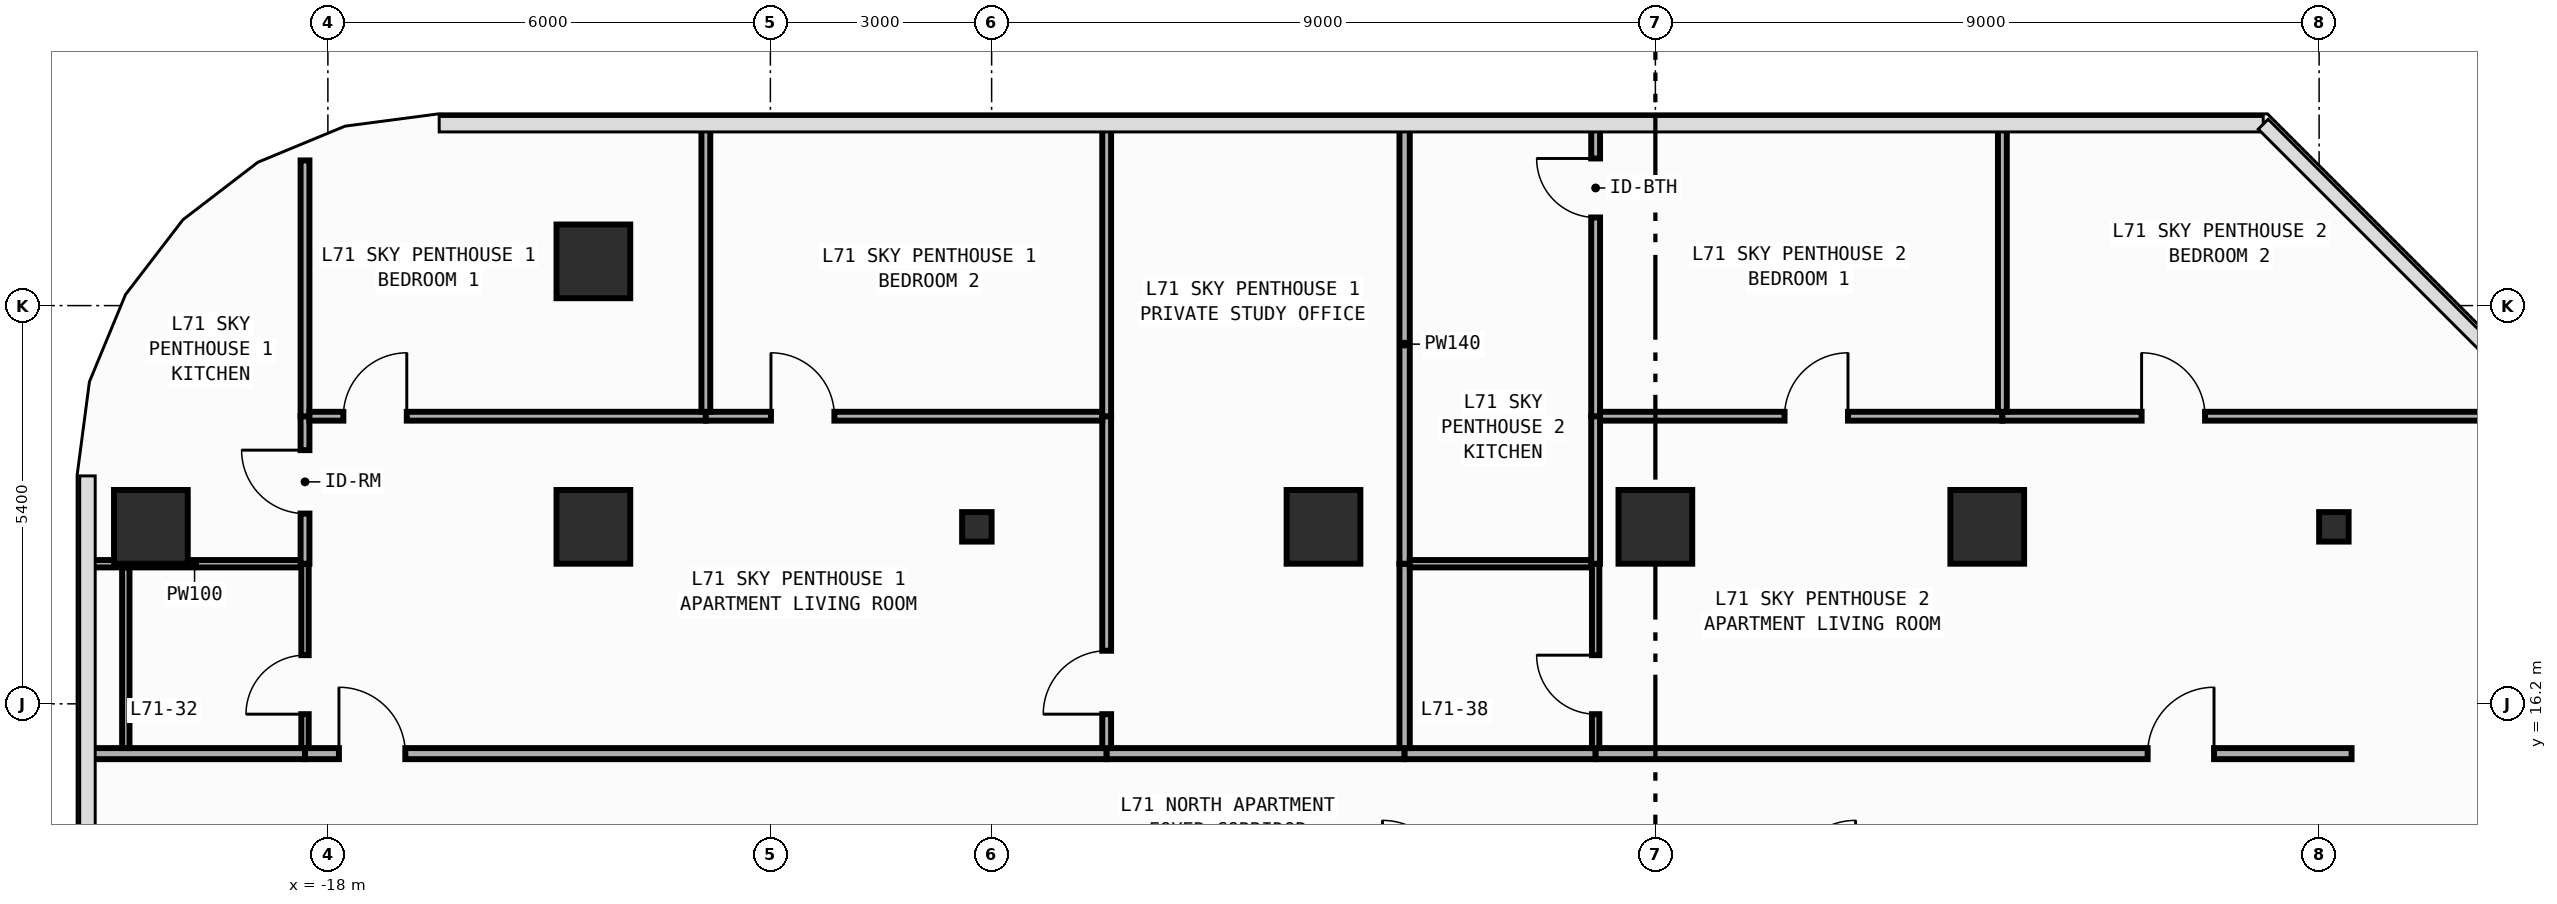
"""IFC4 building model, lengths in metres.
Left out: names, types, materials, properties, quantities, classifications, styles, units other than length and angle.
Written with IfcOpenShell. Run it as: python <this file> out.ifc"""

import sys

from ifc_helpers import new_model, si_unit, direction, frame, frame_2d, origin, origin_2d, place, context, subcontext, project, spatial, rectangle, circle, i_section, extrude, element, fill, save


model = new_model("IFC4")
c1 = context("Model", 3, precision=1e-05, world=origin(), true_north=direction((0.0, 1.0)))
c2 = subcontext(c1, "Body", "Model", "MODEL_VIEW")
j1 = project(units=[si_unit("LENGTHUNIT", "METRE"), si_unit("PLANEANGLEUNIT", "RADIAN")], contexts=[c1])
p1 = place(None, origin())
s1 = spatial("IfcSite", under=j1, at=p1, CompositionType="ELEMENT")
p2 = place(p1, origin())
s2 = spatial("IfcBuilding", under=s1, at=p2, CompositionType="ELEMENT")
p3 = place(p2, frame((0.0, 0.0, 296.6)))
s3 = spatial("IfcBuildingStorey", under=s2, at=p3, CompositionType="ELEMENT", Elevation=296.6)
for number, where, z_axis, x_axis in (
    (1, (-9.2, 18.6, 0.0), (0.0, 0.0, 1.0), (1.0, 0.0, 0.0)),
    (2, (9.2, 18.6, 0.0), (0.0, 0.0, 1.0), (1.0, 0.0, 0.0)),
):
    element("IfcColumn", number, at=place(p3, frame(where, z_axis=z_axis, x_axis=x_axis)), inside=s3, PredefinedType="COLUMN", context=c2, shape_type="SweptSolid", body=[
        extrude(i_section(OverallWidth=0.4, OverallDepth=0.4, WebThickness=0.013, FlangeThickness=0.021, FilletRadius=0.022, at=origin_2d()), origin(), (0.0, 0.0, 1.0), 3.8),
    ])
for number, where, z_axis, x_axis in (
    (3, (-20.4, 18.6, 0.0), (0.0, 0.0, 1.0), (1.0, 0.0, 0.0)),
    (4, (-14.4, 18.6, 0.0), (0.0, 0.0, 1.0), (1.0, 0.0, 0.0)),
    (5, (-4.5, 18.6, 0.0), (0.0, 0.0, 1.0), (1.0, 0.0, 0.0)),
    (6, (0.0, 18.6, 0.0), (0.0, 0.0, 1.0), (1.0, 0.0, 0.0)),
    (7, (4.5, 18.6, 0.0), (0.0, 0.0, 1.0), (1.0, 0.0, 0.0)),
    (8, (-14.4, 22.2, 0.0), (0.0, 0.0, 1.0), (1.0, 0.0, 0.0)),
):
    element("IfcColumn", number, at=place(p3, frame(where, z_axis=z_axis, x_axis=x_axis)), inside=s3, PredefinedType="COLUMN", context=c2, shape_type="SweptSolid", body=[
        extrude(circle(Radius=0.5, at=origin_2d()), origin(), (0.0, 0.0, 1.0), 3.8),
    ])
p4 = place(p3, frame((-21.255, 15.525, 0.0), z_axis=(0.0, 0.0, 1.0), x_axis=(1.0, 0.0, 0.0)))
e9 = element("IfcWall", 9, at=p4, inside=s3, PredefinedType="PARTITIONING", context=c2, shape_type="SweptSolid", body=[
    extrude(rectangle(XDim=2.945, YDim=0.15, at=frame_2d((1.472, 0.0))), origin(), (0.0, 0.0, 1.0), 3.54),
])
p5 = place(p3, frame((-18.31, 15.525, 0.0), z_axis=(0.0, 0.0, 1.0), x_axis=(1.0, 0.0, 0.0)))
e10 = element("IfcWall", 10, at=p5, inside=s3, PredefinedType="PARTITIONING", context=c2, shape_type="SweptSolid", body=[
    extrude(rectangle(XDim=10.87, YDim=0.15, at=frame_2d((5.435, 0.0))), origin(), (0.0, 0.0, 1.0), 3.54),
])
p6 = place(p5, frame((0.46, 0.0, 0.0)))
e11 = element("IfcOpeningElement", 11, at=p6, cuts=e10, PredefinedType="OPENING", context=c2, shape_type="SweptSolid", body=[
    extrude(rectangle(XDim=0.9, YDim=2.15, at=frame_2d((0.45, 1.075))), frame((0.0, 0.085, 0.0), z_axis=(0.0, -1.0, 0.0), x_axis=(1.0, 0.0, 0.0)), (0.0, 0.0, 1.0), 0.17),
])
p7 = place(p3, frame((-7.44, 15.525, 0.0), z_axis=(0.0, 0.0, 1.0), x_axis=(1.0, 0.0, 0.0)))
e12 = element("IfcWall", 12, at=p7, inside=s3, PredefinedType="PARTITIONING", context=c2, shape_type="SweptSolid", body=[
    extrude(rectangle(XDim=4.04, YDim=0.15, at=frame_2d((2.02, 0.0))), origin(), (0.0, 0.0, 1.0), 3.54),
])
p8 = place(p3, frame((-3.4, 15.525, 0.0), z_axis=(0.0, 0.0, 1.0), x_axis=(1.0, 0.0, 0.0)))
e13 = element("IfcWall", 13, at=p8, inside=s3, PredefinedType="PARTITIONING", context=c2, shape_type="SweptSolid", body=[
    extrude(rectangle(XDim=2.59, YDim=0.15, at=frame_2d((1.295, 0.0))), origin(), (0.0, 0.0, 1.0), 3.54),
])
p9 = place(p3, frame((-0.81, 15.525, 0.0), z_axis=(0.0, 0.0, 1.0), x_axis=(1.0, 0.0, 0.0)))
e14 = element("IfcWall", 14, at=p9, inside=s3, PredefinedType="PARTITIONING", context=c2, shape_type="SweptSolid", body=[
    extrude(rectangle(XDim=10.25, YDim=0.15, at=frame_2d((5.125, 0.0))), origin(), (0.0, 0.0, 1.0), 3.54),
])
p10 = place(p9, frame((7.485, 0.0, 0.0)))
e15 = element("IfcOpeningElement", 15, at=p10, cuts=e14, PredefinedType="OPENING", context=c2, shape_type="SweptSolid", body=[
    extrude(rectangle(XDim=0.9, YDim=2.15, at=frame_2d((0.45, 1.075))), frame((0.0, 0.085, 0.0), z_axis=(0.0, -1.0, 0.0), x_axis=(1.0, 0.0, 0.0)), (0.0, 0.0, 1.0), 0.17),
])
p11 = place(p3, frame((-21.255, 18.1, 0.0), z_axis=(0.0, 0.0, 1.0), x_axis=(1.0, 0.0, 0.0)))
e16 = element("IfcWall", 16, at=p11, inside=s3, PredefinedType="PARTITIONING", context=c2, shape_type="SweptSolid", body=[
    extrude(rectangle(XDim=2.895, YDim=0.1, at=frame_2d((1.447, 0.0))), origin(), (0.0, 0.0, 1.0), 3.54),
])
p12 = place(p3, frame((-18.31, 15.6, 0.0), z_axis=(0.0, 0.0, 1.0), x_axis=(0.0, 1.0, 0.0)))
e17 = element("IfcWall", 17, at=p12, inside=s3, PredefinedType="PARTITIONING", context=c2, shape_type="SweptSolid", body=[
    extrude(rectangle(XDim=2.5, YDim=0.1, at=frame_2d((1.25, 0.0))), origin(), (0.0, 0.0, 1.0), 3.54),
])
p13 = place(p12, frame((0.46, 0.0, 0.0)))
e18 = element("IfcOpeningElement", 18, at=p13, cuts=e17, PredefinedType="OPENING", context=c2, shape_type="SweptSolid", body=[
    extrude(rectangle(XDim=0.8, YDim=2.1, at=frame_2d((0.4, 1.05))), frame((0.0, 0.06, 0.0), z_axis=(0.0, -1.0, 0.0), x_axis=(1.0, 0.0, 0.0)), (0.0, 0.0, 1.0), 0.12),
])
p14 = place(p3, frame((-18.31, 18.1, 0.0), z_axis=(0.0, 0.0, 1.0), x_axis=(0.0, 1.0, 0.0)))
e19 = element("IfcWall", 19, at=p14, inside=s3, PredefinedType="PARTITIONING", context=c2, shape_type="SweptSolid", body=[
    extrude(rectangle(XDim=2.0, YDim=0.12, at=frame_2d((1.0, 0.0))), origin(), (0.0, 0.0, 1.0), 3.54),
])
p15 = place(p14, frame((0.68, 0.0, 0.0)))
e20 = element("IfcOpeningElement", 20, at=p15, cuts=e19, PredefinedType="OPENING", context=c2, shape_type="SweptSolid", body=[
    extrude(rectangle(XDim=0.86, YDim=2.15, at=frame_2d((0.43, 1.075))), frame((0.0, 0.07, 0.0), z_axis=(0.0, -1.0, 0.0), x_axis=(1.0, 0.0, 0.0)), (0.0, 0.0, 1.0), 0.14),
])
p16 = place(p3, frame((-18.31, 20.1, 0.0), z_axis=(0.0, 0.0, 1.0), x_axis=(0.0, 1.0, 0.0)))
e21 = element("IfcWall", 21, at=p16, inside=s3, PredefinedType="PARTITIONING", context=c2, shape_type="SweptSolid", body=[
    extrude(rectangle(XDim=3.469, YDim=0.12, at=frame_2d((1.734, 0.0))), origin(), (0.0, 0.0, 1.0), 3.54),
])
p17 = place(p3, frame((-7.44, 15.6, 0.0), z_axis=(0.0, 0.0, 1.0), x_axis=(0.0, 1.0, 0.0)))
e22 = element("IfcWall", 22, at=p17, inside=s3, PredefinedType="PARTITIONING", context=c2, shape_type="SweptSolid", body=[
    extrude(rectangle(XDim=4.5, YDim=0.12, at=frame_2d((2.25, 0.0))), origin(), (0.0, 0.0, 1.0), 3.54),
])
p18 = place(p17, frame((0.46, 0.0, 0.0)))
e23 = element("IfcOpeningElement", 23, at=p18, cuts=e22, PredefinedType="OPENING", context=c2, shape_type="SweptSolid", body=[
    extrude(rectangle(XDim=0.86, YDim=2.15, at=frame_2d((0.43, 1.075))), frame((0.0, 0.07, 0.0), z_axis=(0.0, -1.0, 0.0), x_axis=(1.0, 0.0, 0.0)), (0.0, 0.0, 1.0), 0.14),
])
p19 = place(p3, frame((-18.25, 20.1, 0.0), z_axis=(0.0, 0.0, 1.0), x_axis=(1.0, 0.0, 0.0)))
e24 = element("IfcWall", 24, at=p19, inside=s3, PredefinedType="PARTITIONING", context=c2, shape_type="SweptSolid", body=[
    extrude(rectangle(XDim=5.375, YDim=0.12, at=frame_2d((2.688, 0.0))), origin(), (0.0, 0.0, 1.0), 3.54),
])
p20 = place(p19, frame((0.46, 0.0, 0.0)))
e25 = element("IfcOpeningElement", 25, at=p20, cuts=e24, PredefinedType="OPENING", context=c2, shape_type="SweptSolid", body=[
    extrude(rectangle(XDim=0.86, YDim=2.15, at=frame_2d((0.43, 1.075))), frame((0.0, 0.07, 0.0), z_axis=(0.0, -1.0, 0.0), x_axis=(1.0, 0.0, 0.0)), (0.0, 0.0, 1.0), 0.14),
])
p21 = place(p3, frame((-12.875, 20.1, 0.0), z_axis=(0.0, 0.0, 1.0), x_axis=(1.0, 0.0, 0.0)))
e26 = element("IfcWall", 26, at=p21, inside=s3, PredefinedType="PARTITIONING", context=c2, shape_type="SweptSolid", body=[
    extrude(rectangle(XDim=5.375, YDim=0.12, at=frame_2d((2.688, 0.0))), origin(), (0.0, 0.0, 1.0), 3.54),
])
p22 = place(p21, frame((0.883, 0.0, 0.0)))
e27 = element("IfcOpeningElement", 27, at=p22, cuts=e26, PredefinedType="OPENING", context=c2, shape_type="SweptSolid", body=[
    extrude(rectangle(XDim=0.86, YDim=2.15, at=frame_2d((0.43, 1.075))), frame((0.0, 0.07, 0.0), z_axis=(0.0, -1.0, 0.0), x_axis=(1.0, 0.0, 0.0)), (0.0, 0.0, 1.0), 0.14),
])
p23 = place(p3, frame((-7.44, 20.1, 0.0), z_axis=(0.0, 0.0, 1.0), x_axis=(0.0, 1.0, 0.0)))
e28 = element("IfcWall", 28, at=p23, inside=s3, PredefinedType="PARTITIONING", context=c2, shape_type="SweptSolid", body=[
    extrude(rectangle(XDim=3.955, YDim=0.12, at=frame_2d((1.978, 0.0))), origin(), (0.0, 0.0, 1.0), 3.54),
])
p24 = place(p3, frame((-3.4, 15.6, 0.0), z_axis=(0.0, 0.0, 1.0), x_axis=(0.0, 1.0, 0.0)))
e29 = element("IfcWall", 29, at=p24, inside=s3, PredefinedType="PARTITIONING", context=c2, shape_type="SweptSolid", body=[
    extrude(rectangle(XDim=2.5, YDim=0.14, at=frame_2d((1.25, 0.0))), origin(), (0.0, 0.0, 1.0), 3.54),
])
p25 = place(p3, frame((-3.4, 18.1, 0.0), z_axis=(0.0, 0.0, 1.0), x_axis=(0.0, 1.0, 0.0)))
e30 = element("IfcWall", 30, at=p25, inside=s3, PredefinedType="PARTITIONING", context=c2, shape_type="SweptSolid", body=[
    extrude(rectangle(XDim=5.955, YDim=0.14, at=frame_2d((2.978, 0.0))), origin(), (0.0, 0.0, 1.0), 3.54),
])
p26 = place(p3, frame((-12.875, 20.16, 0.0), z_axis=(0.0, 0.0, 1.0), x_axis=(0.0, 1.0, 0.0)))
e31 = element("IfcWall", 31, at=p26, inside=s3, PredefinedType="PARTITIONING", context=c2, shape_type="SweptSolid", body=[
    extrude(rectangle(XDim=3.895, YDim=0.12, at=frame_2d((1.948, 0.0))), origin(), (0.0, 0.0, 1.0), 3.54),
])
p27 = place(p3, frame((-3.33, 18.1, 0.0), z_axis=(0.0, 0.0, 1.0), x_axis=(1.0, 0.0, 0.0)))
e32 = element("IfcWall", 32, at=p27, inside=s3, PredefinedType="PARTITIONING", context=c2, shape_type="SweptSolid", body=[
    extrude(rectangle(XDim=2.47, YDim=0.1, at=frame_2d((1.235, 0.0))), origin(), (0.0, 0.0, 1.0), 3.54),
])
p28 = place(p3, frame((-0.81, 15.6, 0.0), z_axis=(0.0, 0.0, 1.0), x_axis=(0.0, 1.0, 0.0)))
e33 = element("IfcWall", 33, at=p28, inside=s3, PredefinedType="PARTITIONING", context=c2, shape_type="SweptSolid", body=[
    extrude(rectangle(XDim=2.5, YDim=0.1, at=frame_2d((1.25, 0.0))), origin(), (0.0, 0.0, 1.0), 3.54),
])
p29 = place(p28, frame((0.46, 0.0, 0.0)))
e34 = element("IfcOpeningElement", 34, at=p29, cuts=e33, PredefinedType="OPENING", context=c2, shape_type="SweptSolid", body=[
    extrude(rectangle(XDim=0.8, YDim=2.1, at=frame_2d((0.4, 1.05))), frame((0.0, 0.06, 0.0), z_axis=(0.0, -1.0, 0.0), x_axis=(1.0, 0.0, 0.0)), (0.0, 0.0, 1.0), 0.12),
])
p30 = place(p3, frame((-0.81, 18.1, 0.0), z_axis=(0.0, 0.0, 1.0), x_axis=(0.0, 1.0, 0.0)))
e35 = element("IfcWall", 35, at=p30, inside=s3, PredefinedType="PARTITIONING", context=c2, shape_type="SweptSolid", body=[
    extrude(rectangle(XDim=2.0, YDim=0.12, at=frame_2d((1.0, 0.0))), origin(), (0.0, 0.0, 1.0), 3.54),
])
p31 = place(p3, frame((-0.81, 20.1, 0.0), z_axis=(0.0, 0.0, 1.0), x_axis=(0.0, 1.0, 0.0)))
e36 = element("IfcWall", 36, at=p31, inside=s3, PredefinedType="PARTITIONING", context=c2, shape_type="SweptSolid", body=[
    extrude(rectangle(XDim=3.955, YDim=0.12, at=frame_2d((1.978, 0.0))), origin(), (0.0, 0.0, 1.0), 3.54),
])
p32 = place(p31, frame((2.695, 0.0, 0.0)))
e37 = element("IfcOpeningElement", 37, at=p32, cuts=e36, PredefinedType="OPENING", context=c2, shape_type="SweptSolid", body=[
    extrude(rectangle(XDim=0.8, YDim=2.1, at=frame_2d((0.4, 1.05))), frame((0.0, 0.07, 0.0), z_axis=(0.0, -1.0, 0.0), x_axis=(1.0, 0.0, 0.0)), (0.0, 0.0, 1.0), 0.14),
])
p33 = place(p3, frame((-0.75, 20.1, 0.0), z_axis=(0.0, 0.0, 1.0), x_axis=(1.0, 0.0, 0.0)))
e38 = element("IfcWall", 38, at=p33, inside=s3, PredefinedType="PARTITIONING", context=c2, shape_type="SweptSolid", body=[
    extrude(rectangle(XDim=5.455, YDim=0.12, at=frame_2d((2.728, 0.0))), origin(), (0.0, 0.0, 1.0), 3.54),
])
p34 = place(p33, frame((2.502, 0.0, 0.0)))
e39 = element("IfcOpeningElement", 39, at=p34, cuts=e38, PredefinedType="OPENING", context=c2, shape_type="SweptSolid", body=[
    extrude(rectangle(XDim=0.86, YDim=2.15, at=frame_2d((0.43, 1.075))), frame((0.0, 0.07, 0.0), z_axis=(0.0, -1.0, 0.0), x_axis=(1.0, 0.0, 0.0)), (0.0, 0.0, 1.0), 0.14),
])
p35 = place(p3, frame((4.705, 20.1, 0.0), z_axis=(0.0, 0.0, 1.0), x_axis=(1.0, 0.0, 0.0)))
e40 = element("IfcWall", 40, at=p35, inside=s3, PredefinedType="PARTITIONING", context=c2, shape_type="SweptSolid", body=[
    extrude(rectangle(XDim=7.492, YDim=0.12, at=frame_2d((3.746, 0.0))), origin(), (0.0, 0.0, 1.0), 3.54),
])
p36 = place(p35, frame((1.888, 0.0, 0.0)))
e41 = element("IfcOpeningElement", 41, at=p36, cuts=e40, PredefinedType="OPENING", context=c2, shape_type="SweptSolid", body=[
    extrude(rectangle(XDim=0.86, YDim=2.15, at=frame_2d((0.43, 1.075))), frame((0.0, 0.07, 0.0), z_axis=(0.0, -1.0, 0.0), x_axis=(1.0, 0.0, 0.0)), (0.0, 0.0, 1.0), 0.14),
])
p37 = place(p3, frame((4.705, 20.16, 0.0), z_axis=(0.0, 0.0, 1.0), x_axis=(0.0, 1.0, 0.0)))
e42 = element("IfcWall", 42, at=p37, inside=s3, PredefinedType="PARTITIONING", context=c2, shape_type="SweptSolid", body=[
    extrude(rectangle(XDim=3.895, YDim=0.12, at=frame_2d((1.948, 0.0))), origin(), (0.0, 0.0, 1.0), 3.54),
])
p38 = place(p3, frame((-20.74, 15.6, 0.0), z_axis=(0.0, 0.0, 1.0), x_axis=(0.0, 1.0, 0.0)))
e43 = element("IfcWall", 43, at=p38, inside=s3, PredefinedType="PARTITIONING", context=c2, shape_type="SweptSolid", body=[
    extrude(rectangle(XDim=2.45, YDim=0.1, at=frame_2d((1.225, 0.0))), origin(), (0.0, 0.0, 1.0), 3.54),
])
p39 = place(p6, origin())
e44 = element("IfcDoor", 44, at=p39, inside=s3, OperationType="SINGLE_SWING_LEFT", PredefinedType="DOOR", context=c2, shape_type="SweptSolid", body=[
    extrude(rectangle(XDim=0.9, YDim=2.15, at=frame_2d((0.45, 1.075))), frame((0.0, 0.025, 0.0), z_axis=(0.0, -1.0, 0.0), x_axis=(1.0, 0.0, 0.0)), (0.0, 0.0, 1.0), 0.05),
])
fill(e11, e44)
p40 = place(p10, origin())
e45 = element("IfcDoor", 45, at=p40, inside=s3, OperationType="SINGLE_SWING_RIGHT", PredefinedType="DOOR", context=c2, shape_type="SweptSolid", body=[
    extrude(rectangle(XDim=0.9, YDim=2.15, at=frame_2d((0.45, 1.075))), frame((0.0, 0.025, 0.0), z_axis=(0.0, -1.0, 0.0), x_axis=(1.0, 0.0, 0.0)), (0.0, 0.0, 1.0), 0.05),
])
fill(e15, e45)
p41 = place(p13, origin())
e46 = element("IfcDoor", 46, at=p41, inside=s3, OperationType="SINGLE_SWING_LEFT", PredefinedType="DOOR", context=c2, shape_type="SweptSolid", body=[
    extrude(rectangle(XDim=0.8, YDim=2.1, at=frame_2d((0.4, 1.05))), frame((0.0, 0.025, 0.0), z_axis=(0.0, -1.0, 0.0), x_axis=(1.0, 0.0, 0.0)), (0.0, 0.0, 1.0), 0.05),
])
fill(e18, e46)
p42 = place(p15, origin())
e47 = element("IfcDoor", 47, at=p42, inside=s3, OperationType="SINGLE_SWING_RIGHT", PredefinedType="DOOR", context=c2, shape_type="SweptSolid", body=[
    extrude(rectangle(XDim=0.86, YDim=2.15, at=frame_2d((0.43, 1.075))), frame((0.0, 0.025, 0.0), z_axis=(0.0, -1.0, 0.0), x_axis=(1.0, 0.0, 0.0)), (0.0, 0.0, 1.0), 0.05),
])
fill(e20, e47)
p43 = place(p18, origin())
e48 = element("IfcDoor", 48, at=p43, inside=s3, OperationType="SINGLE_SWING_LEFT", PredefinedType="DOOR", context=c2, shape_type="SweptSolid", body=[
    extrude(rectangle(XDim=0.86, YDim=2.15, at=frame_2d((0.43, 1.075))), frame((0.0, 0.025, 0.0), z_axis=(0.0, -1.0, 0.0), x_axis=(1.0, 0.0, 0.0)), (0.0, 0.0, 1.0), 0.05),
])
fill(e23, e48)
p44 = place(p20, origin())
e49 = element("IfcDoor", 49, at=p44, inside=s3, OperationType="SINGLE_SWING_RIGHT", PredefinedType="DOOR", context=c2, shape_type="SweptSolid", body=[
    extrude(rectangle(XDim=0.86, YDim=2.15, at=frame_2d((0.43, 1.075))), frame((0.0, 0.025, 0.0), z_axis=(0.0, -1.0, 0.0), x_axis=(1.0, 0.0, 0.0)), (0.0, 0.0, 1.0), 0.05),
])
fill(e25, e49)
p45 = place(p22, origin())
e50 = element("IfcDoor", 50, at=p45, inside=s3, OperationType="SINGLE_SWING_LEFT", PredefinedType="DOOR", context=c2, shape_type="SweptSolid", body=[
    extrude(rectangle(XDim=0.86, YDim=2.15, at=frame_2d((0.43, 1.075))), frame((0.0, 0.025, 0.0), z_axis=(0.0, -1.0, 0.0), x_axis=(1.0, 0.0, 0.0)), (0.0, 0.0, 1.0), 0.05),
])
fill(e27, e50)
p46 = place(p29, origin())
e51 = element("IfcDoor", 51, at=p46, inside=s3, OperationType="SINGLE_SWING_RIGHT", PredefinedType="DOOR", context=c2, shape_type="SweptSolid", body=[
    extrude(rectangle(XDim=0.8, YDim=2.1, at=frame_2d((0.4, 1.05))), frame((0.0, 0.025, 0.0), z_axis=(0.0, -1.0, 0.0), x_axis=(1.0, 0.0, 0.0)), (0.0, 0.0, 1.0), 0.05),
])
fill(e34, e51)
p47 = place(p34, origin())
e52 = element("IfcDoor", 52, at=p47, inside=s3, OperationType="SINGLE_SWING_RIGHT", PredefinedType="DOOR", context=c2, shape_type="SweptSolid", body=[
    extrude(rectangle(XDim=0.86, YDim=2.15, at=frame_2d((0.43, 1.075))), frame((0.0, 0.025, 0.0), z_axis=(0.0, -1.0, 0.0), x_axis=(1.0, 0.0, 0.0)), (0.0, 0.0, 1.0), 0.05),
])
fill(e39, e52)
p48 = place(p36, origin())
e53 = element("IfcDoor", 53, at=p48, inside=s3, OperationType="SINGLE_SWING_LEFT", PredefinedType="DOOR", context=c2, shape_type="SweptSolid", body=[
    extrude(rectangle(XDim=0.86, YDim=2.15, at=frame_2d((0.43, 1.075))), frame((0.0, 0.025, 0.0), z_axis=(0.0, -1.0, 0.0), x_axis=(1.0, 0.0, 0.0)), (0.0, 0.0, 1.0), 0.05),
])
fill(e41, e53)
p49 = place(p32, origin())
e54 = element("IfcDoor", 54, at=p49, inside=s3, OperationType="SINGLE_SWING_RIGHT", PredefinedType="DOOR", context=c2, shape_type="SweptSolid", body=[
    extrude(rectangle(XDim=0.8, YDim=2.1, at=frame_2d((0.4, 1.05))), frame((0.0, 0.025, 0.0), z_axis=(0.0, -1.0, 0.0), x_axis=(1.0, 0.0, 0.0)), (0.0, 0.0, 1.0), 0.05),
])
fill(e37, e54)
save(model, sys.argv[1])
